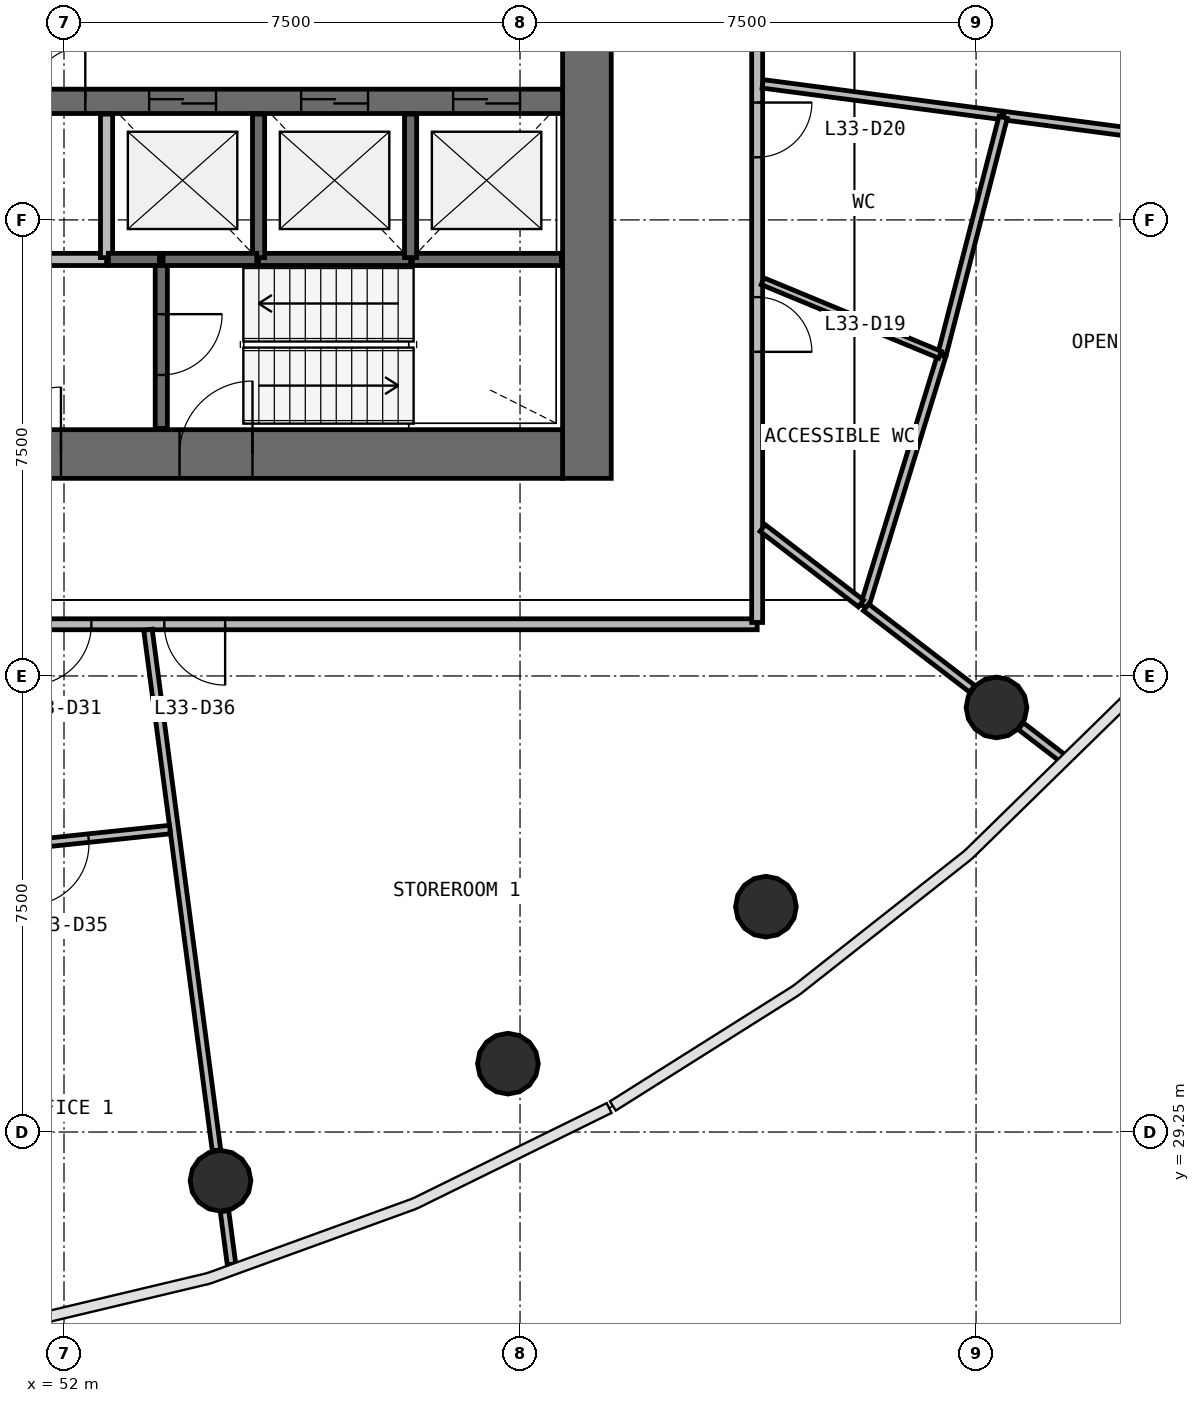
"""IFC4 building model, lengths in metres.
Left out: names, types, materials, properties, quantities, classifications, styles, units other than length and angle.
Written with IfcOpenShell. Run it as: python <this file> out.ifc"""

import sys

from ifc_helpers import new_model, si_unit, direction, frame, frame_2d, origin, origin_2d, place, context, subcontext, project, spatial, rectangle, circle, extrude, source, transform, mapped, element, fill, save


model = new_model("IFC4")
c1 = context("Model", 3, precision=1e-05, world=origin(), true_north=direction((0.0, 1.0)))
c2 = subcontext(c1, "Body", "Model", "MODEL_VIEW")
j1 = project(units=[si_unit("LENGTHUNIT", "METRE"), si_unit("PLANEANGLEUNIT", "RADIAN")], contexts=[c1])
p1 = place(None, origin())
s1 = spatial("IfcSite", under=j1, at=p1, CompositionType="ELEMENT")
p2 = place(p1, origin())
s2 = spatial("IfcBuilding", under=s1, at=p2, CompositionType="ELEMENT")
p3 = place(p2, frame((0.0, 0.0, 140.9)))
s3 = spatial("IfcBuildingStorey", under=s2, at=p3, CompositionType="ELEMENT", Elevation=140.9)
p4 = place(p3, frame((60.6, 40.0, 0.0), z_axis=(0.0, 0.0, 1.0), x_axis=(0.0, 1.0, 0.0)))
e1 = element("IfcWall", 1, at=p4, inside=s3, PredefinedType="SHEAR", context=c2, shape_type="SweptSolid", body=[
    extrude(rectangle(XDim=16.0, YDim=0.8, at=frame_2d((8.0, 0.0))), origin(), (0.0, 0.0, 1.0), 3.9),
])
p5 = place(p4, frame((7.1, 0.0, 0.0)))
e2 = element("IfcOpeningElement", 2, at=p5, cuts=e1, PredefinedType="OPENING", context=c2, shape_type="SweptSolid", body=[
    extrude(rectangle(XDim=1.8, YDim=2.1, at=frame_2d((0.9, 1.05))), frame((0.0, 0.41, 0.0), z_axis=(0.0, -1.0, 0.0), x_axis=(1.0, 0.0, 0.0)), (0.0, 0.0, 1.0), 0.82),
])
p6 = place(p3, frame((43.8, 40.4, 0.0), z_axis=(0.0, 0.0, 1.0), x_axis=(1.0, 0.0, 0.0)))
e3 = element("IfcWall", 3, at=p6, inside=s3, PredefinedType="SHEAR", context=c2, shape_type="SweptSolid", body=[
    extrude(rectangle(XDim=16.4, YDim=0.8, at=frame_2d((8.2, 0.0))), origin(), (0.0, 0.0, 1.0), 3.9),
])
p7 = place(p6, frame((10.1, 0.0, 0.0)))
e4 = element("IfcOpeningElement", 4, at=p7, cuts=e3, PredefinedType="OPENING", context=c2, shape_type="SweptSolid", body=[
    extrude(rectangle(XDim=1.2, YDim=2.1, at=frame_2d((0.6, 1.05))), frame((0.0, 0.41, 0.0), z_axis=(0.0, -1.0, 0.0), x_axis=(1.0, 0.0, 0.0)), (0.0, 0.0, 1.0), 0.82),
])
p8 = place(p6, frame((7.05, 0.0, 0.0)))
e5 = element("IfcOpeningElement", 5, at=p8, cuts=e3, PredefinedType="OPENING", context=c2, shape_type="SweptSolid", body=[
    extrude(rectangle(XDim=1.1, YDim=2.1, at=frame_2d((0.55, 1.05))), frame((0.0, 0.41, 0.0), z_axis=(0.0, -1.0, 0.0), x_axis=(1.0, 0.0, 0.0)), (0.0, 0.0, 1.0), 0.82),
])
p9 = place(p6, frame((0.5, 0.0, 0.0)))
e6 = element("IfcOpeningElement", 6, at=p9, cuts=e3, PredefinedType="OPENING", context=c2, shape_type="SweptSolid", body=[
    extrude(rectangle(XDim=0.8, YDim=2.1, at=frame_2d((0.4, 1.05))), frame((0.0, 0.41, 0.0), z_axis=(0.0, -1.0, 0.0), x_axis=(1.0, 0.0, 0.0)), (0.0, 0.0, 1.0), 0.82),
])
p10 = place(p3, frame((43.8, 46.2, 0.0), z_axis=(0.0, 0.0, 1.0), x_axis=(1.0, 0.0, 0.0)))
e7 = element("IfcWall", 7, at=p10, inside=s3, PredefinedType="SHEAR", context=c2, shape_type="SweptSolid", body=[
    extrude(rectangle(XDim=16.4, YDim=0.4, at=frame_2d((8.2, 0.0))), origin(), (0.0, 0.0, 1.0), 3.9),
])
p11 = place(p10, frame((9.6, 0.0, 0.0)))
e8 = element("IfcOpeningElement", 8, at=p11, cuts=e7, PredefinedType="OPENING", context=c2, shape_type="SweptSolid", body=[
    extrude(rectangle(XDim=1.1, YDim=2.1, at=frame_2d((0.55, 1.05))), frame((0.0, 0.21, 0.0), z_axis=(0.0, -1.0, 0.0), x_axis=(1.0, 0.0, 0.0)), (0.0, 0.0, 1.0), 0.42),
])
p12 = place(p10, frame((12.1, 0.0, 0.0)))
e9 = element("IfcOpeningElement", 9, at=p12, cuts=e7, PredefinedType="OPENING", context=c2, shape_type="SweptSolid", body=[
    extrude(rectangle(XDim=1.1, YDim=2.1, at=frame_2d((0.55, 1.05))), frame((0.0, 0.21, 0.0), z_axis=(0.0, -1.0, 0.0), x_axis=(1.0, 0.0, 0.0)), (0.0, 0.0, 1.0), 0.42),
])
p13 = place(p10, frame((14.6, 0.0, 0.0)))
e10 = element("IfcOpeningElement", 10, at=p13, cuts=e7, PredefinedType="OPENING", context=c2, shape_type="SweptSolid", body=[
    extrude(rectangle(XDim=1.1, YDim=2.1, at=frame_2d((0.55, 1.05))), frame((0.0, 0.21, 0.0), z_axis=(0.0, -1.0, 0.0), x_axis=(1.0, 0.0, 0.0)), (0.0, 0.0, 1.0), 0.42),
])
p14 = place(p10, frame((7.65, 0.0, 0.0)))
e11 = element("IfcOpeningElement", 11, at=p14, cuts=e7, PredefinedType="OPENING", context=c2, shape_type="SweptSolid", body=[
    extrude(rectangle(XDim=0.9, YDim=2.1, at=frame_2d((0.45, 1.05))), frame((0.0, 0.21, 0.0), z_axis=(0.0, -1.0, 0.0), x_axis=(1.0, 0.0, 0.0)), (0.0, 0.0, 1.0), 0.42),
])
m1 = source(origin(), c2, "Body", "SweptSolid", [
    extrude(circle(Radius=0.5, at=origin_2d()), origin(), (0.0, 0.0, 1.0), 3.9),
])
for number, where, z_axis, x_axis in (
    (12, (54.574, 28.449, 0.0), (0.0, 0.0, 1.0), (1.0, 0.0, 0.0)),
    (13, (59.301, 30.374, 0.0), (0.0, 0.0, 1.0), (1.0, 0.0, 0.0)),
    (14, (63.544, 32.956, 0.0), (0.0, 0.0, 1.0), (1.0, 0.0, 0.0)),
    (15, (67.336, 36.232, 0.0), (0.0, 0.0, 1.0), (1.0, 0.0, 0.0)),
):
    element("IfcColumn", number, at=place(p3, frame(where, z_axis=z_axis, x_axis=x_axis)), inside=s3, PredefinedType="COLUMN", context=c2, shape_type="MappedRepresentation", body=[
        mapped(m1, transform((0.0, 0.0, 0.0), scale=1.0)),
    ])
p15 = place(p3, frame((52.7, 43.6, 0.0), z_axis=(0.0, 0.0, 1.0), x_axis=(-1.0, 0.0, 0.0)))
e16 = element("IfcWall", 16, at=p15, inside=s3, PredefinedType="SOLIDWALL", context=c2, shape_type="SweptSolid", body=[
    extrude(rectangle(XDim=4.8, YDim=0.2, at=frame_2d((2.4, 0.0))), origin(), (0.0, 0.0, 1.0), 3.58),
])
p16 = place(p3, frame((53.6, 43.6, 0.0), z_axis=(0.0, 0.0, 1.0), x_axis=(0.0, -1.0, 0.0)))
e17 = element("IfcWall", 17, at=p16, inside=s3, PredefinedType="SOLIDWALL", context=c2, shape_type="SweptSolid", body=[
    extrude(rectangle(XDim=2.78, YDim=0.2, at=frame_2d((1.39, 0.0))), origin(), (0.0, 0.0, 1.0), 3.58),
])
p17 = place(p16, frame((0.9, 0.0, 0.0)))
e18 = element("IfcOpeningElement", 18, at=p17, cuts=e17, PredefinedType="OPENING", context=c2, shape_type="SweptSolid", body=[
    extrude(rectangle(XDim=1.0, YDim=2.1, at=frame_2d((0.5, 1.05))), frame((0.0, 0.11, 0.0), z_axis=(0.0, -1.0, 0.0), x_axis=(1.0, 0.0, 0.0)), (0.0, 0.0, 1.0), 0.22),
])
p18 = place(p3, frame((55.2, 43.6, 0.0), z_axis=(0.0, 0.0, 1.0), x_axis=(1.0, 0.0, 0.0)))
e19 = element("IfcWall", 19, at=p18, inside=s3, PredefinedType="SOLIDWALL", context=c2, shape_type="SweptSolid", body=[
    extrude(rectangle(XDim=2.5, YDim=0.2, at=frame_2d((1.25, 0.0))), origin(), (0.0, 0.0, 1.0), 3.58),
])
p19 = place(p3, frame((57.73, 43.6, 0.0), z_axis=(0.0, 0.0, 1.0), x_axis=(1.0, 0.0, 0.0)))
e20 = element("IfcWall", 20, at=p19, inside=s3, PredefinedType="SOLIDWALL", context=c2, shape_type="SweptSolid", body=[
    extrude(rectangle(XDim=2.45, YDim=0.2, at=frame_2d((1.225, 0.0))), origin(), (0.0, 0.0, 1.0), 3.58),
])
for number, where, z_axis, x_axis in (
    (21, (52.7, 45.99, 0.0), (0.0, 0.0, 1.0), (0.0, -1.0, 0.0)),
    (22, (55.2, 43.63, 0.0), (0.0, 0.0, 1.0), (0.0, 1.0, 0.0)),
    (23, (57.7, 43.63, 0.0), (0.0, 0.0, 1.0), (0.0, 1.0, 0.0)),
):
    element("IfcWall", number, at=place(p3, frame(where, z_axis=z_axis, x_axis=x_axis)), inside=s3, PredefinedType="SOLIDWALL", context=c2, shape_type="SweptSolid", body=[
        extrude(rectangle(XDim=2.36, YDim=0.2, at=frame_2d((1.18, 0.0))), origin(), (0.0, 0.0, 1.0), 3.58),
    ])
p20 = place(p3, frame((53.63, 43.6, 0.0), z_axis=(0.0, 0.0, 1.0), x_axis=(1.0, 0.0, 0.0)))
e24 = element("IfcWall", 24, at=p20, inside=s3, PredefinedType="SOLIDWALL", context=c2, shape_type="SweptSolid", body=[
    extrude(rectangle(XDim=1.54, YDim=0.2, at=frame_2d((0.77, 0.0))), origin(), (0.0, 0.0, 1.0), 3.58),
])
p21 = place(p3, frame((52.73, 43.6, 0.0), z_axis=(0.0, 0.0, 1.0), x_axis=(1.0, 0.0, 0.0)))
e25 = element("IfcWall", 25, at=p21, inside=s3, PredefinedType="SOLIDWALL", context=c2, shape_type="SweptSolid", body=[
    extrude(rectangle(XDim=0.84, YDim=0.2, at=frame_2d((0.42, 0.0))), origin(), (0.0, 0.0, 1.0), 3.58),
])
p22 = place(p3, frame((63.4, 37.6, 0.0), z_axis=(0.0, 0.0, 1.0), x_axis=(-1.0, 0.0, 0.0)))
e26 = element("IfcWall", 26, at=p22, inside=s3, PredefinedType="PARTITIONING", context=c2, shape_type="SweptSolid", body=[
    extrude(rectangle(XDim=22.8, YDim=0.18, at=frame_2d((11.4, 0.0))), origin(), (0.0, 0.0, 1.0), 2.88),
])
p23 = place(p22, frame((10.95, 0.0, 0.0)))
e27 = element("IfcOpeningElement", 27, at=p23, cuts=e26, PredefinedType="OPENING", context=c2, shape_type="SweptSolid", body=[
    extrude(rectangle(XDim=1.0, YDim=2.1, at=frame_2d((0.5, 1.05))), frame((0.0, 0.1, 0.0), z_axis=(0.0, -1.0, 0.0), x_axis=(1.0, 0.0, 0.0)), (0.0, 0.0, 1.0), 0.2),
])
p24 = place(p22, frame((8.75, 0.0, 0.0)))
e28 = element("IfcOpeningElement", 28, at=p24, cuts=e26, PredefinedType="OPENING", context=c2, shape_type="SweptSolid", body=[
    extrude(rectangle(XDim=1.0, YDim=2.1, at=frame_2d((0.5, 1.05))), frame((0.0, 0.1, 0.0), z_axis=(0.0, -1.0, 0.0), x_axis=(1.0, 0.0, 0.0)), (0.0, 0.0, 1.0), 0.2),
])
p25 = place(p3, frame((63.4, 58.37, 0.0), z_axis=(0.0, 0.0, 1.0), x_axis=(0.0, -1.0, 0.0)))
e29 = element("IfcWall", 29, at=p25, inside=s3, PredefinedType="PARTITIONING", context=c2, shape_type="SweptSolid", body=[
    extrude(rectangle(XDim=20.74, YDim=0.18, at=frame_2d((10.37, 0.0))), origin(), (0.0, 0.0, 1.0), 2.88),
])
p26 = place(p25, frame((15.39, 0.0, 0.0)))
e30 = element("IfcOpeningElement", 30, at=p26, cuts=e29, PredefinedType="OPENING", context=c2, shape_type="SweptSolid", body=[
    extrude(rectangle(XDim=0.9, YDim=2.1, at=frame_2d((0.45, 1.05))), frame((0.0, 0.1, 0.0), z_axis=(0.0, -1.0, 0.0), x_axis=(1.0, 0.0, 0.0)), (0.0, 0.0, 1.0), 0.2),
])
p27 = place(p25, frame((12.19, 0.0, 0.0)))
e31 = element("IfcOpeningElement", 31, at=p27, cuts=e29, PredefinedType="OPENING", context=c2, shape_type="SweptSolid", body=[
    extrude(rectangle(XDim=0.9, YDim=2.1, at=frame_2d((0.45, 1.05))), frame((0.0, 0.1, 0.0), z_axis=(0.0, -1.0, 0.0), x_axis=(1.0, 0.0, 0.0)), (0.0, 0.0, 1.0), 0.2),
])
p28 = place(p25, frame((9.89, 0.0, 0.0)))
e32 = element("IfcOpeningElement", 32, at=p28, cuts=e29, PredefinedType="OPENING", context=c2, shape_type="SweptSolid", body=[
    extrude(rectangle(XDim=1.0, YDim=2.1, at=frame_2d((0.5, 1.05))), frame((0.0, 0.1, 0.0), z_axis=(0.0, -1.0, 0.0), x_axis=(1.0, 0.0, 0.0)), (0.0, 0.0, 1.0), 0.2),
])
p29 = place(p3, frame((54.508, 28.949, 0.0), z_axis=(0.0, 0.0, 1.0), x_axis=(-0.130507901859, 0.991447269174, 0.0)))
e33 = element("IfcWall", 33, at=p29, inside=s3, PredefinedType="PARTITIONING", context=c2, shape_type="SweptSolid", body=[
    extrude(rectangle(XDim=8.635, YDim=0.14, at=frame_2d((4.318, 0.0))), origin(), (0.0, 0.0, 1.0), 2.88),
])
p30 = place(p3, frame((72.941, 45.243, 0.0), z_axis=(0.0, 0.0, 1.0), x_axis=(-0.991447989587, 0.130502428879, 0.0)))
e34 = element("IfcWall", 34, at=p30, inside=s3, PredefinedType="PARTITIONING", context=c2, shape_type="SweptSolid", body=[
    extrude(rectangle(XDim=5.536, YDim=0.14, at=frame_2d((2.768, 0.0))), origin(), (0.0, 0.0, 1.0), 2.88),
])
p31 = place(p30, frame((2.286, 0.0, 0.0)))
e35 = element("IfcOpeningElement", 35, at=p31, cuts=e34, PredefinedType="OPENING", context=c2, shape_type="SweptSolid", body=[
    extrude(rectangle(XDim=1.0, YDim=2.1, at=frame_2d((0.5, 1.05))), frame((0.0, 0.08, 0.0), z_axis=(0.0, -1.0, 0.0), x_axis=(1.0, 0.0, 0.0)), (0.0, 0.0, 1.0), 0.16),
])
p32 = place(p3, frame((65.167, 37.897, 0.0), z_axis=(0.0, 0.0, 1.0), x_axis=(0.294141518145, 0.955761877929, 0.0)))
e36 = element("IfcWall", 36, at=p32, inside=s3, PredefinedType="PARTITIONING", context=c2, shape_type="SweptSolid", body=[
    extrude(rectangle(XDim=4.314, YDim=0.14, at=frame_2d((2.157, 0.0))), origin(), (0.0, 0.0, 1.0), 2.88),
])
p33 = place(p3, frame((63.49, 46.487, 0.0), z_axis=(0.0, 0.0, 1.0), x_axis=(0.991443189387, -0.130538891594, 0.0)))
e37 = element("IfcWall", 37, at=p33, inside=s3, PredefinedType="PARTITIONING", context=c2, shape_type="SweptSolid", body=[
    extrude(rectangle(XDim=3.967, YDim=0.14, at=frame_2d((1.983, 0.0))), origin(), (0.0, 0.0, 1.0), 2.88),
])
p34 = place(p3, frame((66.443, 42.05, 0.0), z_axis=(0.0, 0.0, 1.0), x_axis=(0.249613122832, 0.968345645372, 0.0)))
e38 = element("IfcWall", 38, at=p34, inside=s3, PredefinedType="PARTITIONING", context=c2, shape_type="SweptSolid", body=[
    extrude(rectangle(XDim=4.014, YDim=0.14, at=frame_2d((2.007, 0.0))), origin(), (0.0, 0.0, 1.0), 2.88),
])
p35 = place(p3, frame((53.743, 34.224, 0.0), z_axis=(0.0, 0.0, 1.0), x_axis=(-0.994492054084, -0.104811995325, 0.0)))
e39 = element("IfcWall", 39, at=p35, inside=s3, PredefinedType="PARTITIONING", context=c2, shape_type="SweptSolid", body=[
    extrude(rectangle(XDim=3.596, YDim=0.14, at=frame_2d((1.798, 0.0))), origin(), (0.0, 0.0, 1.0), 2.88),
])
p36 = place(p35, frame((1.347, 0.0, 0.0)))
e40 = element("IfcOpeningElement", 40, at=p36, cuts=e39, PredefinedType="OPENING", context=c2, shape_type="SweptSolid", body=[
    extrude(rectangle(XDim=1.0, YDim=2.1, at=frame_2d((0.5, 1.05))), frame((0.0, 0.08, 0.0), z_axis=(0.0, -1.0, 0.0), x_axis=(1.0, 0.0, 0.0)), (0.0, 0.0, 1.0), 0.16),
])
p37 = place(p3, frame((65.19, 37.879, 0.0), z_axis=(0.0, 0.0, 1.0), x_axis=(0.793320542196, -0.608804169934, 0.0)))
e41 = element("IfcWall", 41, at=p37, inside=s3, PredefinedType="PARTITIONING", context=c2, shape_type="SweptSolid", body=[
    extrude(rectangle(XDim=2.2, YDim=0.14, at=frame_2d((1.1, 0.0))), origin(), (0.0, 0.0, 1.0), 2.88),
])
p38 = place(p3, frame((63.49, 39.183, 0.0), z_axis=(0.0, 0.0, 1.0), x_axis=(0.79338464657, -0.6087206277, 0.0)))
e42 = element("IfcWall", 42, at=p38, inside=s3, PredefinedType="PARTITIONING", context=c2, shape_type="SweptSolid", body=[
    extrude(rectangle(XDim=2.039, YDim=0.14, at=frame_2d((1.019, 0.0))), origin(), (0.0, 0.0, 1.0), 2.88),
])
p39 = place(p3, frame((54.64, 27.948, 0.0), z_axis=(0.0, 0.0, 1.0), x_axis=(0.130404378549, -0.991460890835, 0.0)))
e43 = element("IfcWall", 43, at=p39, inside=s3, PredefinedType="PARTITIONING", context=c2, shape_type="SweptSolid", body=[
    extrude(rectangle(XDim=0.882, YDim=0.14, at=frame_2d((0.441, 0.0))), origin(), (0.0, 0.0, 1.0), 2.88),
])
p40 = place(p3, frame((67.737, 35.925, 0.0), z_axis=(0.0, 0.0, 1.0), x_axis=(0.793527999072, -0.608533741619, 0.0)))
e44 = element("IfcWall", 44, at=p40, inside=s3, PredefinedType="PARTITIONING", context=c2, shape_type="SweptSolid", body=[
    extrude(rectangle(XDim=0.853, YDim=0.14, at=frame_2d((0.426, 0.0))), origin(), (0.0, 0.0, 1.0), 2.88),
])
p41 = place(p3, frame((63.49, 43.241, 0.0), z_axis=(0.0, 0.0, 1.0), x_axis=(0.923859477995, -0.382731844662, 0.0)))
e45 = element("IfcWall", 45, at=p41, inside=s3, PredefinedType="PARTITIONING", context=c2, shape_type="SweptSolid", body=[
    extrude(rectangle(XDim=3.158, YDim=0.12, at=frame_2d((1.579, 0.0))), origin(), (0.0, 0.0, 1.0), 2.88),
])
m2 = source(origin(), c2, "Body", "SweptSolid", [
    extrude(rectangle(XDim=1.1, YDim=2.1, at=frame_2d((0.55, 1.05))), frame((0.0, 0.025, 0.0), z_axis=(0.0, -1.0, 0.0), x_axis=(1.0, 0.0, 0.0)), (0.0, 0.0, 1.0), 0.05),
])
p42 = place(p11, origin())
e46 = element("IfcDoor", 46, at=p42, inside=s3, OperationType="DOUBLE_DOOR_SLIDING", PredefinedType="USERDEFINED", context=c2, shape_type="MappedRepresentation", body=[
    mapped(m2, transform((0.0, 0.0, 0.0), scale=1.0)),
])
fill(e8, e46)
p43 = place(p12, origin())
e47 = element("IfcDoor", 47, at=p43, inside=s3, OperationType="DOUBLE_DOOR_SLIDING", PredefinedType="USERDEFINED", context=c2, shape_type="MappedRepresentation", body=[
    mapped(m2, transform((0.0, 0.0, 0.0), scale=1.0)),
])
fill(e9, e47)
p44 = place(p13, origin())
e48 = element("IfcDoor", 48, at=p44, inside=s3, OperationType="DOUBLE_DOOR_SLIDING", PredefinedType="USERDEFINED", context=c2, shape_type="MappedRepresentation", body=[
    mapped(m2, transform((0.0, 0.0, 0.0), scale=1.0)),
])
fill(e10, e48)
m3 = source(origin(), c2, "Body", "SweptSolid", [
    extrude(rectangle(XDim=1.2, YDim=2.1, at=frame_2d((0.6, 1.05))), frame((0.0, 0.025, 0.0), z_axis=(0.0, -1.0, 0.0), x_axis=(1.0, 0.0, 0.0)), (0.0, 0.0, 1.0), 0.05),
])
p45 = place(p7, origin())
e49 = element("IfcDoor", 49, at=p45, inside=s3, OperationType="SINGLE_SWING_RIGHT", PredefinedType="DOOR", context=c2, shape_type="MappedRepresentation", body=[
    mapped(m3, transform((0.0, 0.0, 0.0), scale=1.0)),
])
fill(e4, e49)
m4 = source(origin(), c2, "Body", "SweptSolid", [
    extrude(rectangle(XDim=1.0, YDim=2.1, at=frame_2d((0.5, 1.05))), frame((0.0, 0.025, 0.0), z_axis=(0.0, -1.0, 0.0), x_axis=(1.0, 0.0, 0.0)), (0.0, 0.0, 1.0), 0.05),
])
p46 = place(p17, origin())
e50 = element("IfcDoor", 50, at=p46, inside=s3, OperationType="SINGLE_SWING_LEFT", PredefinedType="DOOR", context=c2, shape_type="MappedRepresentation", body=[
    mapped(m4, transform((0.0, 0.0, 0.0), scale=1.0)),
])
fill(e18, e50)
m5 = source(origin(), c2, "Body", "SweptSolid", [
    extrude(rectangle(XDim=1.1, YDim=2.1, at=frame_2d((0.55, 1.05))), frame((0.0, 0.025, 0.0), z_axis=(0.0, -1.0, 0.0), x_axis=(1.0, 0.0, 0.0)), (0.0, 0.0, 1.0), 0.05),
])
p47 = place(p8, origin())
e51 = element("IfcDoor", 51, at=p47, inside=s3, OperationType="SINGLE_SWING_RIGHT", PredefinedType="DOOR", context=c2, shape_type="MappedRepresentation", body=[
    mapped(m5, transform((0.0, 0.0, 0.0), scale=1.0)),
])
fill(e5, e51)
m6 = source(origin(), c2, "Body", "SweptSolid", [
    extrude(rectangle(XDim=0.9, YDim=2.1, at=frame_2d((0.45, 1.05))), frame((0.0, 0.025, 0.0), z_axis=(0.0, -1.0, 0.0), x_axis=(1.0, 0.0, 0.0)), (0.0, 0.0, 1.0), 0.05),
])
p48 = place(p26, origin())
e52 = element("IfcDoor", 52, at=p48, inside=s3, OperationType="SINGLE_SWING_RIGHT", PredefinedType="DOOR", context=c2, shape_type="MappedRepresentation", body=[
    mapped(m6, transform((0.0, 0.0, 0.0), scale=1.0)),
])
fill(e30, e52)
p49 = place(p27, origin())
e53 = element("IfcDoor", 53, at=p49, inside=s3, OperationType="SINGLE_SWING_LEFT", PredefinedType="DOOR", context=c2, shape_type="MappedRepresentation", body=[
    mapped(m6, transform((0.0, 0.0, 0.0), scale=1.0)),
])
fill(e31, e53)
m7 = source(origin(), c2, "Body", "SweptSolid", [
    extrude(rectangle(XDim=1.0, YDim=2.1, at=frame_2d((0.5, 1.05))), frame((0.0, 0.025, 0.0), z_axis=(0.0, -1.0, 0.0), x_axis=(1.0, 0.0, 0.0)), (0.0, 0.0, 1.0), 0.05),
])
p50 = place(p23, origin())
e54 = element("IfcDoor", 54, at=p50, inside=s3, OperationType="SINGLE_SWING_RIGHT", PredefinedType="DOOR", context=c2, shape_type="MappedRepresentation", body=[
    mapped(m7, transform((0.0, 0.0, 0.0), scale=1.0)),
])
fill(e27, e54)
p51 = place(p36, origin())
e55 = element("IfcDoor", 55, at=p51, inside=s3, OperationType="SINGLE_SWING_RIGHT", PredefinedType="DOOR", context=c2, shape_type="MappedRepresentation", body=[
    mapped(m7, transform((0.0, 0.0, 0.0), scale=1.0)),
])
fill(e40, e55)
p52 = place(p24, origin())
e56 = element("IfcDoor", 56, at=p52, inside=s3, OperationType="SINGLE_SWING_LEFT", PredefinedType="DOOR", context=c2, shape_type="MappedRepresentation", body=[
    mapped(m7, transform((0.0, 0.0, 0.0), scale=1.0)),
])
fill(e28, e56)
m8 = source(origin(), c2, "Body", "SweptSolid", [
    extrude(rectangle(XDim=0.9, YDim=2.1, at=frame_2d((0.45, 1.05))), frame((0.0, 0.025, 0.0), z_axis=(0.0, -1.0, 0.0), x_axis=(1.0, 0.0, 0.0)), (0.0, 0.0, 1.0), 0.05),
])
p53 = place(p14, origin())
e57 = element("IfcDoor", 57, at=p53, inside=s3, OperationType="SINGLE_SWING_RIGHT", PredefinedType="DOOR", context=c2, shape_type="MappedRepresentation", body=[
    mapped(m8, transform((0.0, 0.0, 0.0), scale=1.0)),
])
fill(e11, e57)
save(model, sys.argv[1])
